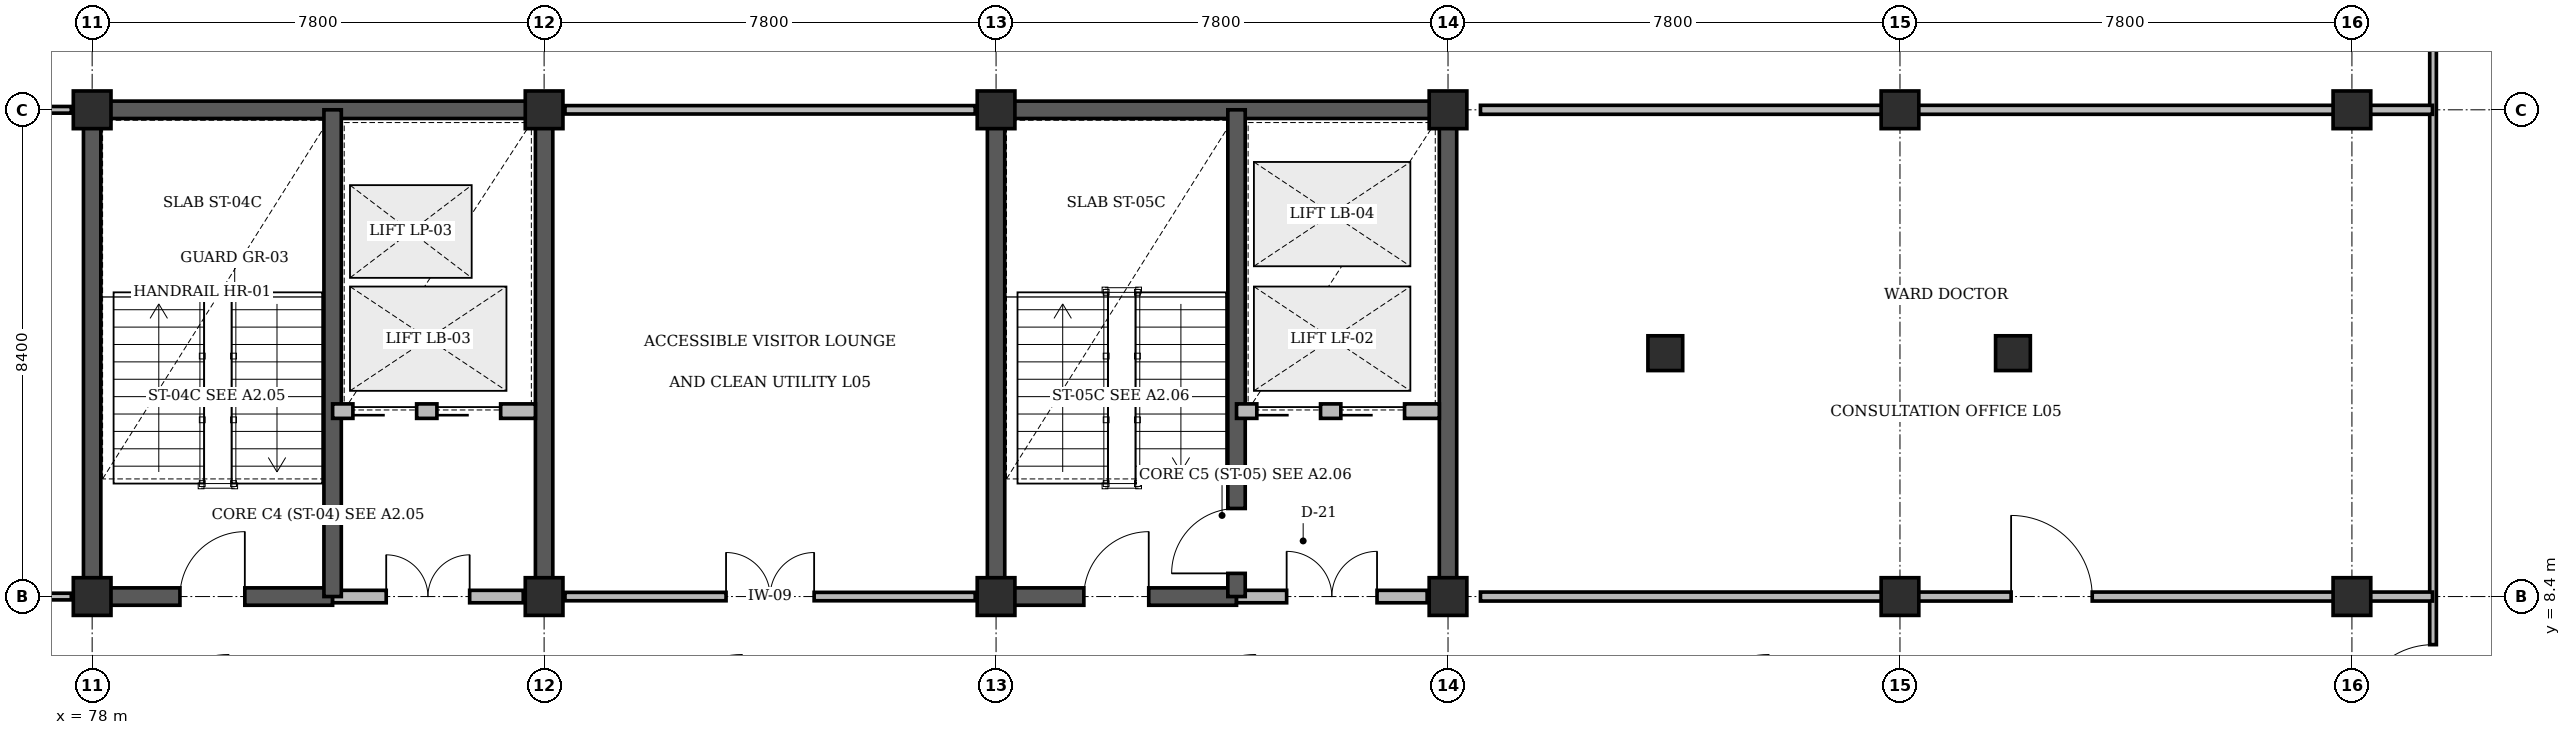
"""IFC4 building model, lengths in metres.
Left out: names, types, materials, properties, quantities, classifications, styles, units other than length and angle.
Written with IfcOpenShell. Run it as: python <this file> out.ifc"""

import sys

from ifc_helpers import new_model, si_unit, direction, frame, frame_2d, origin, origin_2d, place, context, subcontext, project, spatial, rectangle, circle, extrude, element, fill, save


model = new_model("IFC4")
c1 = context("Model", 3, precision=1e-05, world=origin(), true_north=direction((0.0, 1.0)))
c2 = subcontext(c1, "Body", "Model", "MODEL_VIEW")
j1 = project(units=[si_unit("LENGTHUNIT", "METRE"), si_unit("PLANEANGLEUNIT", "RADIAN")], contexts=[c1])
p1 = place(None, origin())
s1 = spatial("IfcSite", under=j1, at=p1, CompositionType="ELEMENT")
p2 = place(p1, origin())
s2 = spatial("IfcBuilding", under=s1, at=p2, CompositionType="ELEMENT")
p3 = place(p2, frame((0.0, 0.0, 22.2)))
s3 = spatial("IfcBuildingStorey", under=s2, at=p3, CompositionType="ELEMENT", Elevation=22.2)
p4 = place(p3, frame((77.85, 16.8, 0.0), z_axis=(0.0, 0.0, 1.0), x_axis=(1.0, 0.0, 0.0)))
e1 = element("IfcWall", 1, at=p4, inside=s3, PredefinedType="SHEAR", context=c2, shape_type="SweptSolid", body=[
    extrude(rectangle(XDim=8.1, YDim=0.3, at=frame_2d((4.05, 0.0))), origin(), (0.0, 0.0, 1.0), 3.92),
])
for number, where, z_axis, x_axis in (
    (2, (78.0, 8.4, 0.0), (0.0, 0.0, 1.0), (0.0, 1.0, 0.0)),
    (3, (85.8, 8.4, 0.0), (0.0, 0.0, 1.0), (0.0, 1.0, 0.0)),
):
    element("IfcWall", number, at=place(p3, frame(where, z_axis=z_axis, x_axis=x_axis)), inside=s3, PredefinedType="SHEAR", context=c2, shape_type="SweptSolid", body=[
        extrude(rectangle(XDim=8.4, YDim=0.3, at=frame_2d((4.2, 0.0))), origin(), (0.0, 0.0, 1.0), 3.92),
    ])
p5 = place(p3, frame((93.45, 16.8, 0.0), z_axis=(0.0, 0.0, 1.0), x_axis=(1.0, 0.0, 0.0)))
e4 = element("IfcWall", 4, at=p5, inside=s3, PredefinedType="SHEAR", context=c2, shape_type="SweptSolid", body=[
    extrude(rectangle(XDim=8.1, YDim=0.3, at=frame_2d((4.05, 0.0))), origin(), (0.0, 0.0, 1.0), 3.92),
])
for number, where, z_axis, x_axis in (
    (5, (93.6, 8.4, 0.0), (0.0, 0.0, 1.0), (0.0, 1.0, 0.0)),
    (6, (101.4, 8.4, 0.0), (0.0, 0.0, 1.0), (0.0, 1.0, 0.0)),
):
    element("IfcWall", number, at=place(p3, frame(where, z_axis=z_axis, x_axis=x_axis)), inside=s3, PredefinedType="SHEAR", context=c2, shape_type="SweptSolid", body=[
        extrude(rectangle(XDim=8.4, YDim=0.3, at=frame_2d((4.2, 0.0))), origin(), (0.0, 0.0, 1.0), 3.92),
    ])
for number, where, z_axis, x_axis in (
    (7, (78.0, 8.4, 0.0), (0.0, 0.0, 1.0), (1.0, 0.0, 0.0)),
    (8, (78.0, 16.8, 0.0), (0.0, 0.0, 1.0), (1.0, 0.0, 0.0)),
    (9, (85.8, 8.4, 0.0), (0.0, 0.0, 1.0), (1.0, 0.0, 0.0)),
    (10, (85.8, 16.8, 0.0), (0.0, 0.0, 1.0), (1.0, 0.0, 0.0)),
    (11, (93.6, 8.4, 0.0), (0.0, 0.0, 1.0), (1.0, 0.0, 0.0)),
    (12, (93.6, 16.8, 0.0), (0.0, 0.0, 1.0), (1.0, 0.0, 0.0)),
    (13, (101.4, 8.4, 0.0), (0.0, 0.0, 1.0), (1.0, 0.0, 0.0)),
    (14, (101.4, 16.8, 0.0), (0.0, 0.0, 1.0), (1.0, 0.0, 0.0)),
    (15, (109.2, 8.4, 0.0), (0.0, 0.0, 1.0), (1.0, 0.0, 0.0)),
    (16, (109.2, 16.8, 0.0), (0.0, 0.0, 1.0), (1.0, 0.0, 0.0)),
    (17, (117.0, 8.4, 0.0), (0.0, 0.0, 1.0), (1.0, 0.0, 0.0)),
    (18, (117.0, 16.8, 0.0), (0.0, 0.0, 1.0), (1.0, 0.0, 0.0)),
):
    element("IfcColumn", number, at=place(p3, frame(where, z_axis=z_axis, x_axis=x_axis)), inside=s3, PredefinedType="COLUMN", context=c2, shape_type="SweptSolid", body=[
        extrude(rectangle(XDim=0.65, YDim=0.65, at=origin_2d()), origin(), (0.0, 0.0, 1.0), 4.2),
    ])
for number, where, z_axis, x_axis in (
    (19, (111.15, 12.6, 0.0), (0.0, 0.0, 1.0), (1.0, 0.0, 0.0)),
    (20, (105.15, 12.6, 0.0), (0.0, 0.0, 1.0), (1.0, 0.0, 0.0)),
):
    element("IfcColumn", number, at=place(p3, frame(where, z_axis=z_axis, x_axis=x_axis)), inside=s3, PredefinedType="PILASTER", context=c2, shape_type="SweptSolid", body=[
        extrude(circle(Radius=0.3, at=origin_2d()), origin(), (0.0, 0.0, 1.0), 4.2),
    ])
p6 = place(p3, frame((78.0, 8.4, 0.0), z_axis=(0.0, 0.0, 1.0), x_axis=(1.0, 0.0, 0.0)))
e21 = element("IfcWall", 21, at=p6, inside=s3, PredefinedType="SHEAR", context=c2, shape_type="SweptSolid", body=[
    extrude(rectangle(XDim=4.15, YDim=0.3, at=frame_2d((2.075, 0.0))), origin(), (0.0, 0.0, 1.0), 4.2),
])
p7 = place(p6, frame((1.515, 0.0, 0.0)))
e22 = element("IfcOpeningElement", 22, at=p7, cuts=e21, PredefinedType="OPENING", context=c2, shape_type="SweptSolid", body=[
    extrude(rectangle(XDim=1.12, YDim=2.15, at=frame_2d((0.56, 1.075))), frame((0.0, 0.16, 0.0), z_axis=(0.0, -1.0, 0.0), x_axis=(1.0, 0.0, 0.0)), (0.0, 0.0, 1.0), 0.32),
])
p8 = place(p3, frame((82.15, 8.4, 0.0), z_axis=(0.0, 0.0, 1.0), x_axis=(1.0, 0.0, 0.0)))
e23 = element("IfcWall", 23, at=p8, inside=s3, PredefinedType="STANDARD", context=c2, shape_type="SweptSolid", body=[
    extrude(rectangle(XDim=3.29, YDim=0.215, at=frame_2d((1.645, 0.0))), origin(), (0.0, 0.0, 1.0), 3.27),
])
p9 = place(p8, frame((0.925, 0.0, 0.0)))
e24 = element("IfcOpeningElement", 24, at=p9, cuts=e23, PredefinedType="OPENING", context=c2, shape_type="SweptSolid", body=[
    extrude(rectangle(XDim=1.44, YDim=2.2, at=frame_2d((0.72, 1.1))), frame((0.0, 0.118, 0.0), z_axis=(0.0, -1.0, 0.0), x_axis=(1.0, 0.0, 0.0)), (0.0, 0.0, 1.0), 0.235),
])
p10 = place(p3, frame((82.15, 8.4, 0.0), z_axis=(0.0, 0.0, 1.0), x_axis=(0.0, 1.0, 0.0)))
e25 = element("IfcWall", 25, at=p10, inside=s3, PredefinedType="SHEAR", context=c2, shape_type="SweptSolid", body=[
    extrude(rectangle(XDim=8.4, YDim=0.3, at=frame_2d((4.2, 0.0))), origin(), (0.0, 0.0, 1.0), 4.2),
])
p11 = place(p3, frame((82.15, 11.6, 0.0), z_axis=(0.0, 0.0, 1.0), x_axis=(1.0, 0.0, 0.0)))
e26 = element("IfcWall", 26, at=p11, inside=s3, PredefinedType="STANDARD", context=c2, shape_type="SweptSolid", body=[
    extrude(rectangle(XDim=3.5, YDim=0.25, at=frame_2d((1.75, 0.0))), origin(), (0.0, 0.0, 1.0), 3.9),
])
p12 = place(p11, frame((0.35, 0.0, 0.0)))
e27 = element("IfcOpeningElement", 27, at=p12, cuts=e26, PredefinedType="OPENING", context=c2, shape_type="SweptSolid", body=[
    extrude(rectangle(XDim=1.1, YDim=2.2, at=frame_2d((0.55, 1.1))), frame((0.0, 0.135, 0.0), z_axis=(0.0, -1.0, 0.0), x_axis=(1.0, 0.0, 0.0)), (0.0, 0.0, 1.0), 0.27),
])
p13 = place(p11, frame((1.8, 0.0, 0.0)))
e28 = element("IfcOpeningElement", 28, at=p13, cuts=e26, PredefinedType="OPENING", context=c2, shape_type="SweptSolid", body=[
    extrude(rectangle(XDim=1.1, YDim=2.2, at=frame_2d((0.55, 1.1))), frame((0.0, 0.135, 0.0), z_axis=(0.0, -1.0, 0.0), x_axis=(1.0, 0.0, 0.0)), (0.0, 0.0, 1.0), 0.27),
])
p14 = place(p3, frame((93.6, 8.4, 0.0), z_axis=(0.0, 0.0, 1.0), x_axis=(1.0, 0.0, 0.0)))
e29 = element("IfcWall", 29, at=p14, inside=s3, PredefinedType="SHEAR", context=c2, shape_type="SweptSolid", body=[
    extrude(rectangle(XDim=4.15, YDim=0.3, at=frame_2d((2.075, 0.0))), origin(), (0.0, 0.0, 1.0), 4.2),
])
p15 = place(p14, frame((1.515, 0.0, 0.0)))
e30 = element("IfcOpeningElement", 30, at=p15, cuts=e29, PredefinedType="OPENING", context=c2, shape_type="SweptSolid", body=[
    extrude(rectangle(XDim=1.12, YDim=2.15, at=frame_2d((0.56, 1.075))), frame((0.0, 0.16, 0.0), z_axis=(0.0, -1.0, 0.0), x_axis=(1.0, 0.0, 0.0)), (0.0, 0.0, 1.0), 0.32),
])
p16 = place(p3, frame((97.75, 8.4, 0.0), z_axis=(0.0, 0.0, 1.0), x_axis=(1.0, 0.0, 0.0)))
e31 = element("IfcWall", 31, at=p16, inside=s3, PredefinedType="STANDARD", context=c2, shape_type="SweptSolid", body=[
    extrude(rectangle(XDim=3.29, YDim=0.215, at=frame_2d((1.645, 0.0))), origin(), (0.0, 0.0, 1.0), 3.27),
])
p17 = place(p16, frame((0.865, 0.0, 0.0)))
e32 = element("IfcOpeningElement", 32, at=p17, cuts=e31, PredefinedType="OPENING", context=c2, shape_type="SweptSolid", body=[
    extrude(rectangle(XDim=1.56, YDim=2.2, at=frame_2d((0.78, 1.1))), frame((0.0, 0.118, 0.0), z_axis=(0.0, -1.0, 0.0), x_axis=(1.0, 0.0, 0.0)), (0.0, 0.0, 1.0), 0.235),
])
p18 = place(p3, frame((97.75, 8.4, 0.0), z_axis=(0.0, 0.0, 1.0), x_axis=(0.0, 1.0, 0.0)))
e33 = element("IfcWall", 33, at=p18, inside=s3, PredefinedType="SHEAR", context=c2, shape_type="SweptSolid", body=[
    extrude(rectangle(XDim=8.4, YDim=0.3, at=frame_2d((4.2, 0.0))), origin(), (0.0, 0.0, 1.0), 4.2),
])
p19 = place(p18, frame((0.4, 0.0, 0.0)))
e34 = element("IfcOpeningElement", 34, at=p19, cuts=e33, PredefinedType="OPENING", context=c2, shape_type="SweptSolid", body=[
    extrude(rectangle(XDim=1.12, YDim=2.15, at=frame_2d((0.56, 1.075))), frame((0.0, 0.16, 0.0), z_axis=(0.0, -1.0, 0.0), x_axis=(1.0, 0.0, 0.0)), (0.0, 0.0, 1.0), 0.32),
])
p20 = place(p3, frame((97.75, 11.6, 0.0), z_axis=(0.0, 0.0, 1.0), x_axis=(1.0, 0.0, 0.0)))
e35 = element("IfcWall", 35, at=p20, inside=s3, PredefinedType="STANDARD", context=c2, shape_type="SweptSolid", body=[
    extrude(rectangle(XDim=3.5, YDim=0.25, at=frame_2d((1.75, 0.0))), origin(), (0.0, 0.0, 1.0), 3.9),
])
p21 = place(p20, frame((0.35, 0.0, 0.0)))
e36 = element("IfcOpeningElement", 36, at=p21, cuts=e35, PredefinedType="OPENING", context=c2, shape_type="SweptSolid", body=[
    extrude(rectangle(XDim=1.1, YDim=2.2, at=frame_2d((0.55, 1.1))), frame((0.0, 0.135, 0.0), z_axis=(0.0, -1.0, 0.0), x_axis=(1.0, 0.0, 0.0)), (0.0, 0.0, 1.0), 0.27),
])
p22 = place(p20, frame((1.8, 0.0, 0.0)))
e37 = element("IfcOpeningElement", 37, at=p22, cuts=e35, PredefinedType="OPENING", context=c2, shape_type="SweptSolid", body=[
    extrude(rectangle(XDim=1.1, YDim=2.2, at=frame_2d((0.55, 1.1))), frame((0.0, 0.135, 0.0), z_axis=(0.0, -1.0, 0.0), x_axis=(1.0, 0.0, 0.0)), (0.0, 0.0, 1.0), 0.27),
])
p23 = place(p3, frame((118.4, 6.0, 0.0), z_axis=(0.0, 0.0, 1.0), x_axis=(0.0, 1.0, 0.0)))
e38 = element("IfcWall", 38, at=p23, inside=s3, PredefinedType="PARTITIONING", context=c2, shape_type="SweptSolid", body=[
    extrude(rectangle(XDim=13.2, YDim=0.115, at=frame_2d((6.6, 0.0))), origin(), (0.0, 0.0, 1.0), 3.9),
])
p24 = place(p23, frame((0.25, 0.0, 0.0)))
e39 = element("IfcOpeningElement", 39, at=p24, cuts=e38, PredefinedType="OPENING", context=c2, shape_type="SweptSolid", body=[
    extrude(rectangle(XDim=1.32, YDim=2.15, at=frame_2d((0.66, 1.075))), frame((0.0, 0.067, 0.0), z_axis=(0.0, -1.0, 0.0), x_axis=(1.0, 0.0, 0.0)), (0.0, 0.0, 1.0), 0.135),
])
for number, where, z_axis, x_axis in (
    (40, (73.2, 8.4, 0.0), (0.0, 0.0, 1.0), (1.0, 0.0, 0.0)),
    (41, (73.2, 16.8, 0.0), (0.0, 0.0, 1.0), (1.0, 0.0, 0.0)),
):
    element("IfcWall", number, at=place(p3, frame(where, z_axis=z_axis, x_axis=x_axis)), inside=s3, PredefinedType="PARTITIONING", context=c2, shape_type="SweptSolid", body=[
        extrude(rectangle(XDim=4.44, YDim=0.115, at=frame_2d((2.22, 0.0))), origin(), (0.0, 0.0, 1.0), 3.27),
    ])
p25 = place(p3, frame((86.16, 8.4, 0.0), z_axis=(0.0, 0.0, 1.0), x_axis=(1.0, 0.0, 0.0)))
e42 = element("IfcWall", 42, at=p25, inside=s3, PredefinedType="PARTITIONING", context=c2, shape_type="SweptSolid", body=[
    extrude(rectangle(XDim=7.08, YDim=0.145, at=frame_2d((3.54, 0.0))), origin(), (0.0, 0.0, 1.0), 3.27),
])
p26 = place(p25, frame((2.78, 0.0, 0.0)))
e43 = element("IfcOpeningElement", 43, at=p26, cuts=e42, PredefinedType="OPENING", context=c2, shape_type="SweptSolid", body=[
    extrude(rectangle(XDim=1.52, YDim=2.2, at=frame_2d((0.76, 1.1))), frame((0.0, 0.083, 0.0), z_axis=(0.0, -1.0, 0.0), x_axis=(1.0, 0.0, 0.0)), (0.0, 0.0, 1.0), 0.165),
])
p27 = place(p3, frame((86.16, 16.8, 0.0), z_axis=(0.0, 0.0, 1.0), x_axis=(1.0, 0.0, 0.0)))
e44 = element("IfcWall", 44, at=p27, inside=s3, PredefinedType="PARTITIONING", context=c2, shape_type="SweptSolid", body=[
    extrude(rectangle(XDim=7.08, YDim=0.145, at=frame_2d((3.54, 0.0))), origin(), (0.0, 0.0, 1.0), 3.27),
])
p28 = place(p3, frame((101.96, 8.4, 0.0), z_axis=(0.0, 0.0, 1.0), x_axis=(1.0, 0.0, 0.0)))
e45 = element("IfcWall", 45, at=p28, inside=s3, PredefinedType="PARTITIONING", context=c2, shape_type="SweptSolid", body=[
    extrude(rectangle(XDim=16.43, YDim=0.155, at=frame_2d((8.215, 0.0))), origin(), (0.0, 0.0, 1.0), 3.27),
])
p29 = place(p28, frame((9.158, 0.0, 0.0)))
e46 = element("IfcOpeningElement", 46, at=p29, cuts=e45, PredefinedType="OPENING", context=c2, shape_type="SweptSolid", body=[
    extrude(rectangle(XDim=1.4, YDim=2.2, at=frame_2d((0.7, 1.1))), frame((0.0, 0.087, 0.0), z_axis=(0.0, -1.0, 0.0), x_axis=(1.0, 0.0, 0.0)), (0.0, 0.0, 1.0), 0.175),
])
p30 = place(p3, frame((101.96, 16.8, 0.0), z_axis=(0.0, 0.0, 1.0), x_axis=(1.0, 0.0, 0.0)))
e47 = element("IfcWall", 47, at=p30, inside=s3, PredefinedType="PARTITIONING", context=c2, shape_type="SweptSolid", body=[
    extrude(rectangle(XDim=16.43, YDim=0.155, at=frame_2d((8.215, 0.0))), origin(), (0.0, 0.0, 1.0), 3.27),
])
p31 = place(p7, origin())
e48 = element("IfcDoor", 48, at=p31, inside=s3, OperationType="SINGLE_SWING_RIGHT", PredefinedType="DOOR", context=c2, shape_type="SweptSolid", body=[
    extrude(rectangle(XDim=1.12, YDim=2.15, at=frame_2d((0.56, 1.075))), frame((0.0, 0.025, 0.0), z_axis=(0.0, -1.0, 0.0), x_axis=(1.0, 0.0, 0.0)), (0.0, 0.0, 1.0), 0.05),
])
fill(e22, e48)
p32 = place(p9, origin())
e49 = element("IfcDoor", 49, at=p32, inside=s3, OperationType="DOUBLE_DOOR_SINGLE_SWING", PredefinedType="DOOR", context=c2, shape_type="SweptSolid", body=[
    extrude(rectangle(XDim=1.44, YDim=2.2, at=frame_2d((0.72, 1.1))), frame((0.0, 0.025, 0.0), z_axis=(0.0, -1.0, 0.0), x_axis=(1.0, 0.0, 0.0)), (0.0, 0.0, 1.0), 0.05),
])
fill(e24, e49)
p33 = place(p12, origin())
e50 = element("IfcDoor", 50, at=p33, inside=s3, OperationType="SLIDING_TO_LEFT", PredefinedType="DOOR", context=c2, shape_type="SweptSolid", body=[
    extrude(rectangle(XDim=1.1, YDim=2.2, at=frame_2d((0.55, 1.1))), frame((0.0, 0.025, 0.0), z_axis=(0.0, -1.0, 0.0), x_axis=(1.0, 0.0, 0.0)), (0.0, 0.0, 1.0), 0.05),
])
fill(e27, e50)
p34 = place(p13, origin())
e51 = element("IfcDoor", 51, at=p34, inside=s3, OperationType="SLIDING_TO_LEFT", PredefinedType="DOOR", context=c2, shape_type="SweptSolid", body=[
    extrude(rectangle(XDim=1.1, YDim=2.2, at=frame_2d((0.55, 1.1))), frame((0.0, 0.025, 0.0), z_axis=(0.0, -1.0, 0.0), x_axis=(1.0, 0.0, 0.0)), (0.0, 0.0, 1.0), 0.05),
])
fill(e28, e51)
p35 = place(p15, origin())
e52 = element("IfcDoor", 52, at=p35, inside=s3, OperationType="SINGLE_SWING_RIGHT", PredefinedType="DOOR", context=c2, shape_type="SweptSolid", body=[
    extrude(rectangle(XDim=1.12, YDim=2.15, at=frame_2d((0.56, 1.075))), frame((0.0, 0.025, 0.0), z_axis=(0.0, -1.0, 0.0), x_axis=(1.0, 0.0, 0.0)), (0.0, 0.0, 1.0), 0.05),
])
fill(e30, e52)
p36 = place(p17, origin())
e53 = element("IfcDoor", 53, at=p36, inside=s3, OperationType="DOUBLE_DOOR_SINGLE_SWING", PredefinedType="DOOR", context=c2, shape_type="SweptSolid", body=[
    extrude(rectangle(XDim=1.56, YDim=2.2, at=frame_2d((0.78, 1.1))), frame((0.0, 0.025, 0.0), z_axis=(0.0, -1.0, 0.0), x_axis=(1.0, 0.0, 0.0)), (0.0, 0.0, 1.0), 0.05),
])
fill(e32, e53)
p37 = place(p19, origin())
e54 = element("IfcDoor", 54, at=p37, inside=s3, OperationType="SINGLE_SWING_LEFT", PredefinedType="DOOR", context=c2, shape_type="SweptSolid", body=[
    extrude(rectangle(XDim=1.12, YDim=2.15, at=frame_2d((0.56, 1.075))), frame((0.0, 0.025, 0.0), z_axis=(0.0, -1.0, 0.0), x_axis=(1.0, 0.0, 0.0)), (0.0, 0.0, 1.0), 0.05),
])
fill(e34, e54)
p38 = place(p21, origin())
e55 = element("IfcDoor", 55, at=p38, inside=s3, OperationType="SLIDING_TO_LEFT", PredefinedType="DOOR", context=c2, shape_type="SweptSolid", body=[
    extrude(rectangle(XDim=1.1, YDim=2.2, at=frame_2d((0.55, 1.1))), frame((0.0, 0.025, 0.0), z_axis=(0.0, -1.0, 0.0), x_axis=(1.0, 0.0, 0.0)), (0.0, 0.0, 1.0), 0.05),
])
fill(e36, e55)
p39 = place(p22, origin())
e56 = element("IfcDoor", 56, at=p39, inside=s3, OperationType="SLIDING_TO_LEFT", PredefinedType="DOOR", context=c2, shape_type="SweptSolid", body=[
    extrude(rectangle(XDim=1.1, YDim=2.2, at=frame_2d((0.55, 1.1))), frame((0.0, 0.025, 0.0), z_axis=(0.0, -1.0, 0.0), x_axis=(1.0, 0.0, 0.0)), (0.0, 0.0, 1.0), 0.05),
])
fill(e37, e56)
p40 = place(p24, origin())
e57 = element("IfcDoor", 57, at=p40, inside=s3, OperationType="SINGLE_SWING_LEFT", PredefinedType="DOOR", context=c2, shape_type="SweptSolid", body=[
    extrude(rectangle(XDim=1.32, YDim=2.15, at=frame_2d((0.66, 1.075))), frame((0.0, 0.025, 0.0), z_axis=(0.0, -1.0, 0.0), x_axis=(1.0, 0.0, 0.0)), (0.0, 0.0, 1.0), 0.05),
])
fill(e39, e57)
p41 = place(p26, origin())
e58 = element("IfcDoor", 58, at=p41, inside=s3, OperationType="DOUBLE_DOOR_SINGLE_SWING", PredefinedType="DOOR", context=c2, shape_type="SweptSolid", body=[
    extrude(rectangle(XDim=1.52, YDim=2.2, at=frame_2d((0.76, 1.1))), frame((0.0, 0.025, 0.0), z_axis=(0.0, -1.0, 0.0), x_axis=(1.0, 0.0, 0.0)), (0.0, 0.0, 1.0), 0.05),
])
fill(e43, e58)
p42 = place(p29, origin())
e59 = element("IfcDoor", 59, at=p42, inside=s3, OperationType="SINGLE_SWING_LEFT", PredefinedType="DOOR", context=c2, shape_type="SweptSolid", body=[
    extrude(rectangle(XDim=1.4, YDim=2.2, at=frame_2d((0.7, 1.1))), frame((0.0, 0.025, 0.0), z_axis=(0.0, -1.0, 0.0), x_axis=(1.0, 0.0, 0.0)), (0.0, 0.0, 1.0), 0.05),
])
fill(e46, e59)
save(model, sys.argv[1])
